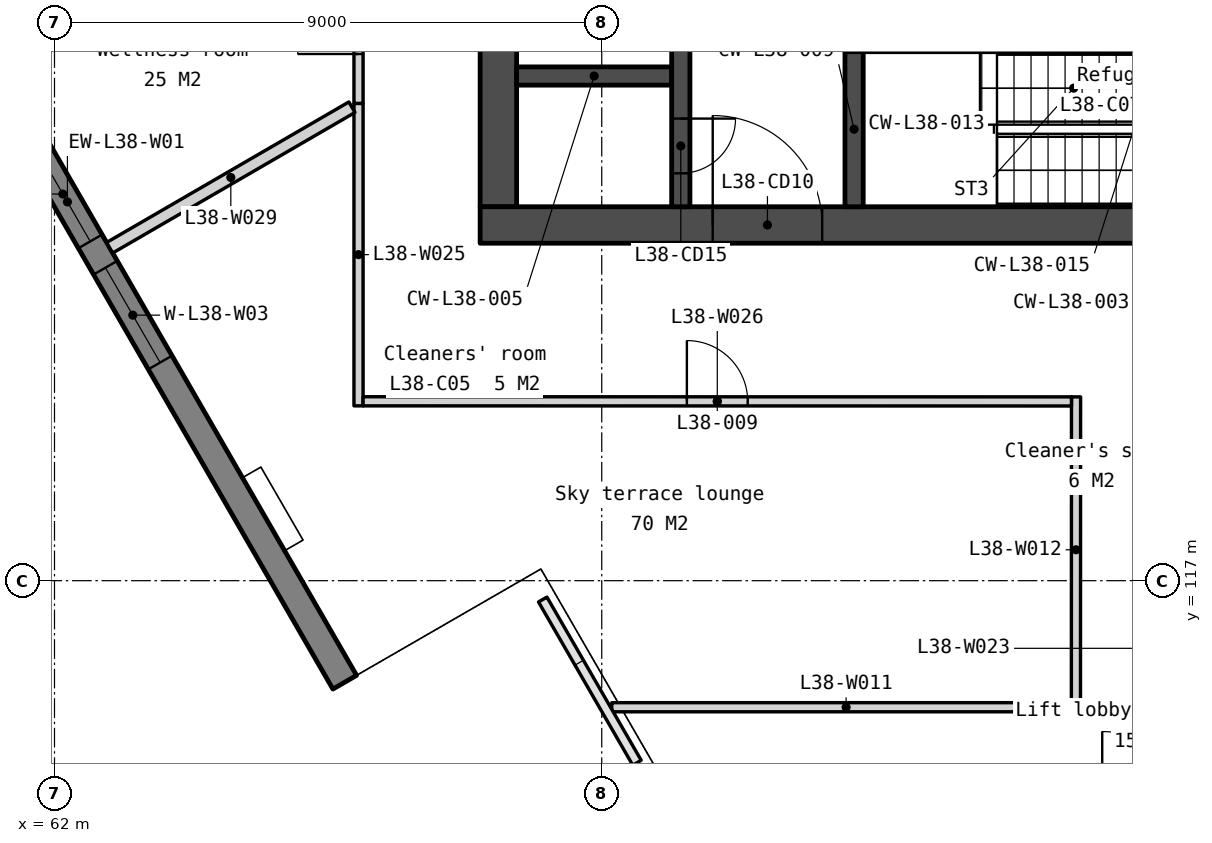
"""IFC4 building model, lengths in metres.
Left out: names, types, materials, properties, quantities, classifications, styles, units other than length and angle.
Written with IfcOpenShell. Run it as: python <this file> out.ifc"""

import sys

from ifc_helpers import new_model, si_unit, direction, frame, frame_2d, origin, place, context, subcontext, project, spatial, polyline, rectangle, outline, extrude, element, fill, save


model = new_model("IFC4")
c1 = context("Model", 3, precision=1e-05, world=origin(), true_north=direction((0.0, 1.0)))
c2 = subcontext(c1, "Body", "Model", "MODEL_VIEW")
j1 = project(units=[si_unit("LENGTHUNIT", "METRE"), si_unit("PLANEANGLEUNIT", "RADIAN")], contexts=[c1])
p1 = place(None, origin())
s1 = spatial("IfcSite", under=j1, at=p1, CompositionType="ELEMENT")
p2 = place(p1, origin())
s2 = spatial("IfcBuilding", under=s1, at=p2, CompositionType="ELEMENT")
p3 = place(p2, frame((0.0, 0.0, 152.0)))
s3 = spatial("IfcBuildingStorey", under=s2, at=p3, CompositionType="ELEMENT", Elevation=152.0)
p4 = place(p3, frame((69.3, 133.95, 0.0), z_axis=(0.0, 0.0, 1.0), x_axis=(0.0, -1.0, 0.0)))
e1 = element("IfcWall", 1, at=p4, inside=s3, PredefinedType="SOLIDWALL", context=c2, shape_type="SweptSolid", body=[
    extrude(rectangle(XDim=10.8, YDim=0.6, at=frame_2d((5.4, 0.0))), origin(), (0.0, 0.0, 1.0), 3.75),
])
p5 = place(p3, frame((69.0, 122.85, 0.0), z_axis=(0.0, 0.0, 1.0), x_axis=(1.0, 0.0, 0.0)))
e2 = element("IfcWall", 2, at=p5, inside=s3, PredefinedType="SOLIDWALL", context=c2, shape_type="SweptSolid", body=[
    extrude(rectangle(XDim=22.0, YDim=0.6, at=frame_2d((11.0, 0.0))), origin(), (0.0, 0.0, 1.0), 3.75),
])
p6 = place(p5, frame((16.375, 0.0, 0.0)))
e3 = element("IfcOpeningElement", 3, at=p6, cuts=e2, PredefinedType="OPENING", context=c2, shape_type="SweptSolid", body=[
    extrude(rectangle(XDim=1.8, YDim=2.1, at=frame_2d((0.9, 1.05))), frame((0.0, 0.31, 0.0), z_axis=(0.0, -1.0, 0.0), x_axis=(1.0, 0.0, 0.0)), (0.0, 0.0, 1.0), 0.62),
])
p7 = place(p5, frame((3.825, 0.0, 0.0)))
e4 = element("IfcOpeningElement", 4, at=p7, cuts=e2, PredefinedType="OPENING", context=c2, shape_type="SweptSolid", body=[
    extrude(rectangle(XDim=1.8, YDim=2.1, at=frame_2d((0.9, 1.05))), frame((0.0, 0.31, 0.0), z_axis=(0.0, -1.0, 0.0), x_axis=(1.0, 0.0, 0.0)), (0.0, 0.0, 1.0), 0.62),
])
p8 = place(p5, frame((12.85, 0.0, 0.0)))
e5 = element("IfcOpeningElement", 5, at=p8, cuts=e2, PredefinedType="OPENING", context=c2, shape_type="SweptSolid", body=[
    extrude(rectangle(XDim=1.5, YDim=2.1, at=frame_2d((0.75, 1.05))), frame((0.0, 0.31, 0.0), z_axis=(0.0, -1.0, 0.0), x_axis=(1.0, 0.0, 0.0)), (0.0, 0.0, 1.0), 0.62),
])
p9 = place(p3, frame((69.6, 125.3, 0.0), z_axis=(0.0, 0.0, 1.0), x_axis=(1.0, 0.0, 0.0)))
e6 = element("IfcWall", 6, at=p9, inside=s3, PredefinedType="SOLIDWALL", context=c2, shape_type="SweptSolid", body=[
    extrude(rectangle(XDim=2.55, YDim=0.3, at=frame_2d((1.275, 0.0))), origin(), (0.0, 0.0, 1.0), 3.75),
])
p10 = place(p3, frame((72.3, 133.95, 0.0), z_axis=(0.0, 0.0, 1.0), x_axis=(0.0, -1.0, 0.0)))
e7 = element("IfcWall", 7, at=p10, inside=s3, PredefinedType="SOLIDWALL", context=c2, shape_type="SweptSolid", body=[
    extrude(rectangle(XDim=10.8, YDim=0.3, at=frame_2d((5.4, 0.0))), origin(), (0.0, 0.0, 1.0), 3.75),
])
p11 = place(p10, frame((6.95, 0.0, 0.0)))
e8 = element("IfcOpeningElement", 8, at=p11, cuts=e7, PredefinedType="OPENING", context=c2, shape_type="SweptSolid", body=[
    extrude(rectangle(XDim=1.1, YDim=2.1, at=frame_2d((0.55, 1.05))), frame((0.0, 0.16, 0.0), z_axis=(0.0, -1.0, 0.0), x_axis=(1.0, 0.0, 0.0)), (0.0, 0.0, 1.0), 0.32),
])
p12 = place(p10, frame((9.35, 0.0, 0.0)))
e9 = element("IfcOpeningElement", 9, at=p12, cuts=e7, PredefinedType="OPENING", context=c2, shape_type="SweptSolid", body=[
    extrude(rectangle(XDim=0.9, YDim=2.1, at=frame_2d((0.45, 1.05))), frame((0.0, 0.16, 0.0), z_axis=(0.0, -1.0, 0.0), x_axis=(1.0, 0.0, 0.0)), (0.0, 0.0, 1.0), 0.32),
])
p13 = place(p10, frame((5.1, 0.0, 0.0)))
e10 = element("IfcOpeningElement", 10, at=p13, cuts=e7, PredefinedType="OPENING", context=c2, shape_type="SweptSolid", body=[
    extrude(rectangle(XDim=1.0, YDim=2.1, at=frame_2d((0.5, 1.05))), frame((0.0, 0.16, 0.0), z_axis=(0.0, -1.0, 0.0), x_axis=(1.0, 0.0, 0.0)), (0.0, 0.0, 1.0), 0.32),
])
p14 = place(p3, frame((75.15, 125.7, 0.0), z_axis=(0.0, 0.0, 1.0), x_axis=(0.0, -1.0, 0.0)))
e11 = element("IfcWall", 11, at=p14, inside=s3, PredefinedType="SOLIDWALL", context=c2, shape_type="SweptSolid", body=[
    extrude(rectangle(XDim=2.55, YDim=0.3, at=frame_2d((1.275, 0.0))), origin(), (0.0, 0.0, 1.0), 3.75),
])
p15 = place(p3, frame((57.652, 131.129, -0.15), z_axis=(0.0, 0.0, 1.0), x_axis=(0.50000511266, -0.866022451969, 0.0)))
e12 = element("IfcWall", 12, at=p15, inside=s3, PredefinedType="SOLIDWALL", context=c2, shape_type="SweptSolid", body=[
    extrude(outline(polyline([(0.0, 0.0), (0.0, 3.9), (18.243, 3.9), (18.243, 0.0), (0.0, 0.0)])), frame((0.0, 0.225, 0.0), z_axis=(0.0, -1.0, 0.0), x_axis=(1.0, 0.0, 0.0)), (0.0, 0.0, 1.0), 0.45),
])
p16 = place(p15, frame((0.87, 0.0, 0.95)))
e13 = element("IfcOpeningElement", 13, at=p16, cuts=e12, PredefinedType="OPENING", context=c2, shape_type="SweptSolid", body=[
    extrude(rectangle(XDim=1.2, YDim=2.2, at=frame_2d((0.6, 1.1))), frame((0.0, 0.235, 0.0), z_axis=(0.0, -1.0, 0.0), x_axis=(1.0, 0.0, 0.0)), (0.0, 0.0, 1.0), 0.47),
])
p17 = place(p15, frame((8.072, 0.0, 0.95)))
e14 = element("IfcOpeningElement", 14, at=p17, cuts=e12, PredefinedType="OPENING", context=c2, shape_type="SweptSolid", body=[
    extrude(rectangle(XDim=1.8, YDim=2.2, at=frame_2d((0.9, 1.1))), frame((0.0, 0.235, 0.0), z_axis=(0.0, -1.0, 0.0), x_axis=(1.0, 0.0, 0.0)), (0.0, 0.0, 1.0), 0.47),
])
p18 = place(p15, frame((10.372, 0.0, 0.95)))
e15 = element("IfcOpeningElement", 15, at=p18, cuts=e12, PredefinedType="OPENING", context=c2, shape_type="SweptSolid", body=[
    extrude(rectangle(XDim=1.8, YDim=2.2, at=frame_2d((0.9, 1.1))), frame((0.0, 0.235, 0.0), z_axis=(0.0, -1.0, 0.0), x_axis=(1.0, 0.0, 0.0)), (0.0, 0.0, 1.0), 0.47),
])
p19 = place(p2, frame((0.0, 0.0, 148.1)))
s4 = spatial("IfcBuildingStorey", under=s2, at=p19, CompositionType="ELEMENT", Elevation=148.1)
p20 = place(p19, frame((66.691, 115.022, 0.0), z_axis=(0.0, 0.0, 1.0), x_axis=(0.866020906874, 0.500007788796, 0.0)))
e16 = element("IfcWall", 16, at=p20, inside=s4, PredefinedType="SOLIDWALL", context=c2, shape_type="SweptSolid", body=[
    extrude(rectangle(XDim=3.95, YDim=0.45, at=frame_2d((1.975, 0.0))), origin(), (0.0, 0.0, 1.0), 7.65),
])
p21 = place(p19, frame((68.466, 111.948, 0.0), z_axis=(0.0, 0.0, 1.0), x_axis=(0.866005453737, 0.500034552904, 0.0)))
e17 = element("IfcWall", 17, at=p21, inside=s4, PredefinedType="SOLIDWALL", context=c2, shape_type="SweptSolid", body=[
    extrude(rectangle(XDim=3.95, YDim=0.45, at=frame_2d((1.975, 0.0))), origin(), (0.0, 0.0, 1.0), 7.65),
])
p22 = place(p3, frame((71.165, 114.918, 0.0), z_axis=(0.0, 0.0, 1.0), x_axis=(1.0, 0.0, 0.0)))
e18 = element("IfcWall", 18, at=p22, inside=s3, PredefinedType="PARTITIONING", context=c2, shape_type="SweptSolid", body=[
    extrude(rectangle(XDim=7.708, YDim=0.15, at=frame_2d((3.854, 0.0))), origin(), (0.0, 0.0, 1.0), 3.75),
])
p23 = place(p3, frame((78.798, 114.993, 0.0), z_axis=(0.0, 0.0, 1.0), x_axis=(0.000388330634, 0.9999999246, 0.0)))
e19 = element("IfcWall", 19, at=p23, inside=s3, PredefinedType="PARTITIONING", context=c2, shape_type="SweptSolid", body=[
    extrude(rectangle(XDim=5.03, YDim=0.15, at=frame_2d((2.515, 0.0))), origin(), (0.0, 0.0, 1.0), 3.75),
])
p24 = place(p3, frame((67.0, 119.875, 0.0), z_axis=(0.0, 0.0, 1.0), x_axis=(0.0, 1.0, 0.0)))
e20 = element("IfcWall", 20, at=p24, inside=s3, PredefinedType="PARTITIONING", context=c2, shape_type="SweptSolid", body=[
    extrude(rectangle(XDim=4.975, YDim=0.15, at=frame_2d((2.487, 0.0))), origin(), (0.0, 0.0, 1.0), 3.75),
])
p25 = place(p3, frame((67.075, 119.95, 0.0), z_axis=(0.0, 0.0, 1.0), x_axis=(0.999999985947, -0.000167648104, 0.0)))
e21 = element("IfcWall", 21, at=p25, inside=s3, PredefinedType="PARTITIONING", context=c2, shape_type="SweptSolid", body=[
    extrude(rectangle(XDim=11.65, YDim=0.15, at=frame_2d((5.825, 0.0))), origin(), (0.0, 0.0, 1.0), 3.75),
])
p26 = place(p25, frame((5.325, 0.0, 0.0)))
e22 = element("IfcOpeningElement", 22, at=p26, cuts=e21, PredefinedType="OPENING", context=c2, shape_type="SweptSolid", body=[
    extrude(rectangle(XDim=1.0, YDim=2.1, at=frame_2d((0.5, 1.05))), frame((0.0, 0.085, 0.0), z_axis=(0.0, -1.0, 0.0), x_axis=(1.0, 0.0, 0.0)), (0.0, 0.0, 1.0), 0.17),
])
p27 = place(p3, frame((62.907, 122.476, 0.0), z_axis=(0.0, 0.0, 1.0), x_axis=(0.864998983095, 0.501773613539, 0.0)))
e23 = element("IfcWall", 23, at=p27, inside=s3, PredefinedType="PARTITIONING", context=c2, shape_type="SweptSolid", body=[
    extrude(rectangle(XDim=4.606, YDim=0.2, at=frame_2d((2.303, 0.0))), origin(), (0.0, 0.0, 1.0), 3.75),
])
p28 = place(p3, frame((67.0, 124.85, 0.0), z_axis=(0.0, 0.0, 1.0), x_axis=(0.0, 1.0, 0.0)))
e24 = element("IfcWall", 24, at=p28, inside=s3, PredefinedType="PARTITIONING", context=c2, shape_type="SweptSolid", body=[
    extrude(rectangle(XDim=2.625, YDim=0.15, at=frame_2d((1.312, 0.0))), origin(), (0.0, 0.0, 1.0), 3.75),
])
p29 = place(p28, frame((0.812, 0.0, 0.0)))
e25 = element("IfcOpeningElement", 25, at=p29, cuts=e24, PredefinedType="OPENING", context=c2, shape_type="SweptSolid", body=[
    extrude(rectangle(XDim=1.0, YDim=2.1, at=frame_2d((0.5, 1.05))), frame((0.0, 0.085, 0.0), z_axis=(0.0, -1.0, 0.0), x_axis=(1.0, 0.0, 0.0)), (0.0, 0.0, 1.0), 0.17),
])
p30 = place(p7, origin())
e26 = element("IfcDoor", 26, at=p30, inside=s3, OperationType="DOUBLE_DOOR_DOUBLE_SWING", PredefinedType="DOOR", context=c2, shape_type="SweptSolid", body=[
    extrude(rectangle(XDim=1.8, YDim=2.1, at=frame_2d((0.9, 1.05))), frame((0.0, 0.025, 0.0), z_axis=(0.0, -1.0, 0.0), x_axis=(1.0, 0.0, 0.0)), (0.0, 0.0, 1.0), 0.05),
])
fill(e4, e26)
p31 = place(p12, origin())
e27 = element("IfcDoor", 27, at=p31, inside=s3, OperationType="SINGLE_SWING_LEFT", PredefinedType="DOOR", context=c2, shape_type="SweptSolid", body=[
    extrude(rectangle(XDim=0.9, YDim=2.1, at=frame_2d((0.45, 1.05))), frame((0.0, 0.025, 0.0), z_axis=(0.0, -1.0, 0.0), x_axis=(1.0, 0.0, 0.0)), (0.0, 0.0, 1.0), 0.05),
])
fill(e9, e27)
p32 = place(p17, origin())
e28 = element("IfcWindow", 28, at=p32, inside=s3, PartitioningType="SINGLE_PANEL", PredefinedType="WINDOW", context=c2, shape_type="SweptSolid", body=[
    extrude(rectangle(XDim=1.8, YDim=2.2, at=frame_2d((0.9, 1.1))), frame((0.0, 0.03, 0.0), z_axis=(0.0, -1.0, 0.0), x_axis=(1.0, 0.0, 0.0)), (0.0, 0.0, 1.0), 0.06),
])
fill(e14, e28)
p33 = place(p18, origin())
e29 = element("IfcWindow", 29, at=p33, inside=s3, PartitioningType="SINGLE_PANEL", PredefinedType="WINDOW", context=c2, shape_type="SweptSolid", body=[
    extrude(rectangle(XDim=1.8, YDim=2.2, at=frame_2d((0.9, 1.1))), frame((0.0, 0.03, 0.0), z_axis=(0.0, -1.0, 0.0), x_axis=(1.0, 0.0, 0.0)), (0.0, 0.0, 1.0), 0.06),
])
fill(e15, e29)
p34 = place(p29, origin())
e30 = element("IfcDoor", 30, at=p34, inside=s3, OperationType="SINGLE_SWING_LEFT", PredefinedType="DOOR", context=c2, shape_type="SweptSolid", body=[
    extrude(rectangle(XDim=1.0, YDim=2.1, at=frame_2d((0.5, 1.05))), frame((0.0, 0.025, 0.0), z_axis=(0.0, -1.0, 0.0), x_axis=(1.0, 0.0, 0.0)), (0.0, 0.0, 1.0), 0.05),
])
fill(e25, e30)
p35 = place(p26, origin())
e31 = element("IfcDoor", 31, at=p35, inside=s3, OperationType="SINGLE_SWING_LEFT", PredefinedType="DOOR", context=c2, shape_type="SweptSolid", body=[
    extrude(rectangle(XDim=1.0, YDim=2.1, at=frame_2d((0.5, 1.05))), frame((0.0, 0.025, 0.0), z_axis=(0.0, -1.0, 0.0), x_axis=(1.0, 0.0, 0.0)), (0.0, 0.0, 1.0), 0.05),
])
fill(e22, e31)
save(model, sys.argv[1])
